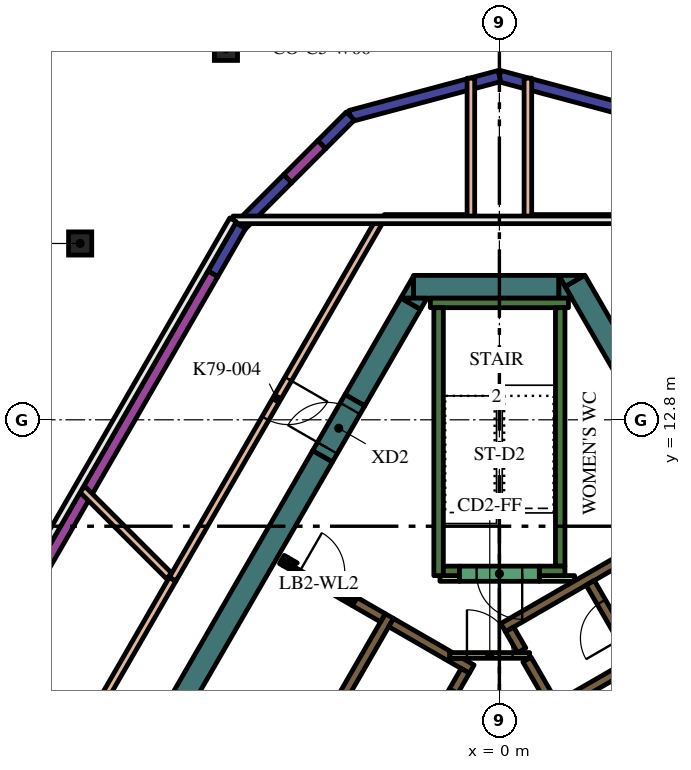
"""IFC4 building model, lengths in metres.
Left out: names, types, materials, properties, quantities, classifications, styles, units other than length and angle.
Written with IfcOpenShell. Run it as: python <this file> out.ifc"""

import sys

from ifc_helpers import new_model, si_unit, direction, frame, frame_2d, origin, origin_2d, place, context, subcontext, project, spatial, polyline, rectangle, hollow_circle, outline, extrude, element, fill, save


model = new_model("IFC4")
c1 = context("Model", 3, precision=1e-05, world=origin(), true_north=direction((0.0, 1.0)))
c2 = subcontext(c1, "Body", "Model", "MODEL_VIEW")
j1 = project(units=[si_unit("LENGTHUNIT", "METRE"), si_unit("PLANEANGLEUNIT", "RADIAN")], contexts=[c1])
p1 = place(None, origin())
s1 = spatial("IfcSite", under=j1, at=p1, CompositionType="ELEMENT")
p2 = place(p1, origin())
s2 = spatial("IfcBuilding", under=s1, at=p2, CompositionType="ELEMENT")
p3 = place(p2, frame((0.0, 0.0, 340.2)))
s3 = spatial("IfcBuildingStorey", under=s2, at=p3, CompositionType="ELEMENT", Elevation=340.2)
for number, where, z_axis, x_axis in (
    (1, (-7.195, 22.561, 0.0), (0.0, 0.0, 1.0), (1.0, 0.0, 0.0)),
    (2, (-11.032, 17.44, 0.0), (0.0, 0.0, 1.0), (1.0, 0.0, 0.0)),
):
    element("IfcColumn", number, at=place(p3, frame(where, z_axis=z_axis, x_axis=x_axis)), inside=s3, PredefinedType="COLUMN", context=c2, shape_type="SweptSolid", body=[
        extrude(hollow_circle(Radius=0.305, WallThickness=0.025, at=origin_2d()), origin(), (0.0, 0.0, 1.0), 4.2),
    ])
p4 = place(p3, frame((1.989, 16.456, 0.0), z_axis=(0.0, 0.0, 1.0), x_axis=(0.499990476767, -0.866030901956, 0.0)))
e3 = element("IfcWall", 3, at=p4, inside=s3, PredefinedType="SOLIDWALL", context=c2, shape_type="SweptSolid", body=[
    extrude(rectangle(XDim=7.438, YDim=0.6, at=frame_2d((3.719, 0.0))), origin(), (0.0, 0.0, 1.0), 4.2),
])
p5 = place(p3, origin())
e4 = element("IfcWall", 4, at=p5, inside=s3, PredefinedType="SOLIDWALL", context=c2, shape_type="SweptSolid", body=[
    extrude(outline(polyline([(1.559, 16.6), (2.235, 16.6), (1.728, 16.307), (1.559, 16.6)])), origin(), (0.0, 0.0, 1.0), 4.2),
])
p6 = place(p3, frame((-2.258, 16.3, 0.0), z_axis=(0.0, 0.0, 1.0), x_axis=(1.0, 0.0, 0.0)))
e5 = element("IfcWall", 5, at=p6, inside=s3, PredefinedType="SOLIDWALL", context=c2, shape_type="SweptSolid", body=[
    extrude(rectangle(XDim=3.823, YDim=0.6, at=frame_2d((1.912, 0.0))), origin(), (0.0, 0.0, 1.0), 4.2),
])
e6 = element("IfcWall", 6, at=p5, inside=s3, PredefinedType="SOLIDWALL", context=c2, shape_type="SweptSolid", body=[
    extrude(outline(polyline([(1.905, 16.0), (1.567, 16.0), (1.567, 16.585), (1.905, 16.0)])), origin(), (0.0, 0.0, 1.0), 4.2),
])
e7 = element("IfcWall", 7, at=p5, inside=s3, PredefinedType="SOLIDWALL", context=c2, shape_type="SweptSolid", body=[
    extrude(outline(polyline([(-2.598, 16.0), (-2.26, 16.585), (-2.26, 16.0), (-2.598, 16.0)])), origin(), (0.0, 0.0, 1.0), 4.2),
])
p7 = place(p3, frame((-2.335, 15.855, 0.0), z_axis=(0.0, 0.0, 1.0), x_axis=(-0.499960127962, -0.866048422692, 0.0)))
e8 = element("IfcWall", 8, at=p7, inside=s3, PredefinedType="SOLIDWALL", context=c2, shape_type="SweptSolid", body=[
    extrude(rectangle(XDim=2.934, YDim=0.6, at=frame_2d((1.467, 0.0))), origin(), (0.0, 0.0, 1.0), 4.2),
])
e9 = element("IfcWall", 9, at=p5, inside=s3, PredefinedType="SOLIDWALL", context=c2, shape_type="SweptSolid", body=[
    extrude(outline(polyline([(-1.905, 16.0), (-2.074, 15.707), (-2.581, 16.0), (-1.905, 16.0)])), origin(), (0.0, 0.0, 1.0), 4.2),
])
p8 = place(p3, frame((-4.652, 11.842, 0.0), z_axis=(0.0, 0.0, 1.0), x_axis=(-0.500003640647, -0.866023301845, 0.0)))
e10 = element("IfcWall", 10, at=p8, inside=s3, PredefinedType="SOLIDWALL", context=c2, shape_type="SweptSolid", body=[
    extrude(rectangle(XDim=15.858, YDim=0.6, at=frame_2d((7.929, 0.0))), origin(), (0.0, 0.0, 1.0), 4.2),
])
p9 = place(p3, frame((-1.817, 15.875, 0.0), z_axis=(0.0, 0.0, 1.0), x_axis=(1.0, 0.0, 0.0)))
e11 = element("IfcWall", 11, at=p9, inside=s3, PredefinedType="SOLIDWALL", context=c2, shape_type="SweptSolid", body=[
    extrude(rectangle(XDim=3.634, YDim=0.25, at=frame_2d((1.817, 0.0))), origin(), (0.0, 0.0, 1.0), 4.2),
])
p10 = place(p3, frame((1.6, 8.95, 0.0), z_axis=(0.0, 0.0, 1.0), x_axis=(0.0, 1.0, 0.0)))
e12 = element("IfcWall", 12, at=p10, inside=s3, PredefinedType="SOLIDWALL", context=c2, shape_type="SweptSolid", body=[
    extrude(rectangle(XDim=6.8, YDim=0.25, at=frame_2d((3.4, 0.0))), origin(), (0.0, 0.0, 1.0), 4.2),
])
p11 = place(p3, frame((1.05, 8.825, 0.0), z_axis=(0.0, 0.0, 1.0), x_axis=(1.0, 0.0, 0.0)))
e13 = element("IfcWall", 13, at=p11, inside=s3, PredefinedType="SOLIDWALL", context=c2, shape_type="SweptSolid", body=[
    extrude(rectangle(XDim=0.675, YDim=0.25, at=frame_2d((0.337, 0.0))), origin(), (0.0, 0.0, 1.0), 4.2),
])
p12 = place(p3, frame((-1.6, 8.7, 0.0), z_axis=(0.0, 0.0, 1.0), x_axis=(0.0, 1.0, 0.0)))
e14 = element("IfcWall", 14, at=p12, inside=s3, PredefinedType="SOLIDWALL", context=c2, shape_type="SweptSolid", body=[
    extrude(rectangle(XDim=7.05, YDim=0.25, at=frame_2d((3.525, 0.0))), origin(), (0.0, 0.0, 1.0), 4.2),
])
p13 = place(p3, frame((-1.475, 8.825, 0.0), z_axis=(0.0, 0.0, 1.0), x_axis=(1.0, 0.0, 0.0)))
e15 = element("IfcWall", 15, at=p13, inside=s3, PredefinedType="SOLIDWALL", context=c2, shape_type="SweptSolid", body=[
    extrude(rectangle(XDim=0.425, YDim=0.25, at=frame_2d((0.212, 0.0))), origin(), (0.0, 0.0, 1.0), 4.2),
])
p14 = place(p3, frame((3.647, 9.38, 0.0), z_axis=(0.0, 0.0, 1.0), x_axis=(-0.866027868628, -0.499995730742, 0.0)))
e16 = element("IfcWall", 16, at=p14, inside=s3, PredefinedType="SOLIDWALL", context=c2, shape_type="SweptSolid", body=[
    extrude(rectangle(XDim=4.099, YDim=0.25, at=frame_2d((2.049, 0.0))), origin(), (0.0, 0.0, 1.0), 4.2),
])
p15 = place(p3, frame((0.268, 7.285, 0.0), z_axis=(0.0, 0.0, 1.0), x_axis=(0.500098681536, -0.865968422476, 0.0)))
e17 = element("IfcWall", 17, at=p15, inside=s3, PredefinedType="SOLIDWALL", context=c2, shape_type="SweptSolid", body=[
    extrude(rectangle(XDim=0.636, YDim=0.25, at=frame_2d((0.318, 0.0))), origin(), (0.0, 0.0, 1.0), 4.2),
])
p16 = place(p3, frame((5.97, -2.591, 0.0), z_axis=(0.0, 0.0, 1.0), x_axis=(-0.499994469932, 0.866028596547, 0.0)))
e18 = element("IfcWall", 18, at=p16, inside=s3, PredefinedType="SOLIDWALL", context=c2, shape_type="SweptSolid", body=[
    extrude(rectangle(XDim=10.488, YDim=0.25, at=frame_2d((5.244, 0.0))), origin(), (0.0, 0.0, 1.0), 4.2),
])
p17 = place(p3, frame((1.574, 5.274, 0.0), z_axis=(0.0, 0.0, 1.0), x_axis=(0.866028486751, 0.499994660107, 0.0)))
e19 = element("IfcWall", 19, at=p17, inside=s3, PredefinedType="SOLIDWALL", context=c2, shape_type="SweptSolid", body=[
    extrude(rectangle(XDim=2.2, YDim=0.25, at=frame_2d((1.1, 0.0))), origin(), (0.0, 0.0, 1.0), 4.2),
])
p18 = place(p3, frame((-8.06, -1.311, 0.0), z_axis=(0.0, 0.0, 1.0), x_axis=(0.50000273126, 0.866023826885, 0.0)))
e20 = element("IfcWall", 20, at=p18, inside=s3, PredefinedType="SOLIDWALL", context=c2, shape_type="SweptSolid", body=[
    extrude(rectangle(XDim=10.33, YDim=0.25, at=frame_2d((5.165, 0.0))), origin(), (0.0, 0.0, 1.0), 4.2),
])
e21 = element("IfcWall", 21, at=p5, inside=s3, PredefinedType="SOLIDWALL", context=c2, shape_type="SweptSolid", body=[
    extrude(outline(polyline([(-2.912, 7.356), (-2.787, 7.573), (-1.232, 6.675), (-1.303, 6.675), (-1.304, 6.675), (-1.304, 6.675), (-1.304, 6.525), (-1.304, 6.525), (-1.303, 6.525), (-0.971, 6.525), (-0.665, 6.348), (-0.79, 6.132), (-1.007, 6.257), (-1.007, 6.257), (-2.912, 7.356)])), origin(), (0.0, 0.0, 1.0), 4.2),
])
p19 = place(p3, frame((-5.725, 9.125, 0.0), z_axis=(0.0, 0.0, 1.0), x_axis=(0.866185586049, -0.49972245349, 0.0)))
e22 = element("IfcWall", 22, at=p19, inside=s3, PredefinedType="SOLIDWALL", context=c2, shape_type="SweptSolid", body=[
    extrude(rectangle(XDim=0.11, YDim=0.25, at=frame_2d((0.055, 0.0))), origin(), (0.0, 0.0, 1.0), 4.2),
])
p20 = place(p3, frame((-3.066, 7.59, 0.0), z_axis=(0.0, 0.0, 1.0), x_axis=(-0.866081358704, 0.49990307071, 0.0)))
e23 = element("IfcWall", 23, at=p20, inside=s3, PredefinedType="SOLIDWALL", context=c2, shape_type="SweptSolid", body=[
    extrude(rectangle(XDim=0.858, YDim=0.25, at=frame_2d((0.429, 0.0))), origin(), (0.0, 0.0, 1.0), 4.2),
])
e24 = element("IfcWall", 24, at=p5, inside=s3, PredefinedType="SOLIDWALL", context=c2, shape_type="SweptSolid", body=[
    extrude(outline(polyline([(-3.748, 8.128), (-3.813, 8.015), (-4.027, 8.139), (-4.017, 8.156), (-4.008, 8.173), (-4.0, 8.192), (-3.995, 8.21), (-3.991, 8.23), (-3.99, 8.25), (-3.99, 8.268), (-3.748, 8.128)])), origin(), (0.0, 0.0, 1.0), 4.2),
])
e25 = element("IfcWall", 25, at=p5, inside=s3, PredefinedType="SOLIDWALL", context=c2, shape_type="SweptSolid", body=[
    extrude(outline(polyline([(-5.689, 8.96), (-5.69, 8.961), (-5.565, 9.177), (-5.319, 9.035), (-5.335, 9.026), (-5.351, 9.015), (-5.366, 9.002), (-5.379, 8.988), (-5.392, 8.972), (-5.402, 8.956), (-5.412, 8.939), (-5.629, 9.064), (-5.629, 9.064), (-5.689, 8.96)])), origin(), (0.0, 0.0, 1.0), 4.2),
])
p21 = place(p3, frame((1.05, 8.625, 0.0), z_axis=(0.0, 0.0, 1.0), x_axis=(1.0, 0.0, 0.0)))
e26 = element("IfcWall", 26, at=p21, inside=s3, PredefinedType="PARTITIONING", context=c2, shape_type="SweptSolid", body=[
    extrude(rectangle(XDim=0.929, YDim=0.15, at=frame_2d((0.464, 0.0))), origin(), (0.0, 0.0, 1.0), 3.45),
])
p22 = place(p3, frame((-1.564, 8.625, 0.0), z_axis=(0.0, 0.0, 1.0), x_axis=(1.0, 0.0, 0.0)))
e27 = element("IfcWall", 27, at=p22, inside=s3, PredefinedType="PARTITIONING", context=c2, shape_type="SweptSolid", body=[
    extrude(rectangle(XDim=0.514, YDim=0.15, at=frame_2d((0.257, 0.0))), origin(), (0.0, 0.0, 1.0), 3.45),
])
p23 = place(p3, frame((8.565, -2.185, 0.0), z_axis=(0.0, 0.0, 1.0), x_axis=(-0.499997954832, 0.866026584559, 0.0)))
e28 = element("IfcWall", 28, at=p23, inside=s3, PredefinedType="SOLIDWALL", context=c2, shape_type="SweptSolid", body=[
    extrude(rectangle(XDim=12.35, YDim=0.25, at=frame_2d((6.175, 0.0))), origin(), (0.0, 0.0, 1.0), 4.2),
])
p24 = place(p23, frame((0.685, 0.0, 0.0)))
e29 = element("IfcOpeningElement", 29, at=p24, cuts=e28, PredefinedType="OPENING", context=c2, shape_type="SweptSolid", body=[
    extrude(rectangle(XDim=0.9, YDim=2.1, at=frame_2d((0.45, 1.05))), frame((0.0, 0.135, 0.0), z_axis=(0.0, -1.0, 0.0), x_axis=(1.0, 0.0, 0.0)), (0.0, 0.0, 1.0), 0.27),
])
p25 = place(p23, frame((3.105, 0.0, 0.0)))
e30 = element("IfcOpeningElement", 30, at=p25, cuts=e28, PredefinedType="OPENING", context=c2, shape_type="SweptSolid", body=[
    extrude(rectangle(XDim=1.1, YDim=2.1, at=frame_2d((0.55, 1.05))), frame((0.0, 0.135, 0.0), z_axis=(0.0, -1.0, 0.0), x_axis=(1.0, 0.0, 0.0)), (0.0, 0.0, 1.0), 0.27),
])
p26 = place(p23, frame((5.625, 0.0, 0.0)))
e31 = element("IfcOpeningElement", 31, at=p26, cuts=e28, PredefinedType="OPENING", context=c2, shape_type="SweptSolid", body=[
    extrude(rectangle(XDim=1.1, YDim=2.1, at=frame_2d((0.55, 1.05))), frame((0.0, 0.135, 0.0), z_axis=(0.0, -1.0, 0.0), x_axis=(1.0, 0.0, 0.0)), (0.0, 0.0, 1.0), 0.27),
])
p27 = place(p23, frame((8.145, 0.0, 0.0)))
e32 = element("IfcOpeningElement", 32, at=p27, cuts=e28, PredefinedType="OPENING", context=c2, shape_type="SweptSolid", body=[
    extrude(rectangle(XDim=1.1, YDim=2.1, at=frame_2d((0.55, 1.05))), frame((0.0, 0.135, 0.0), z_axis=(0.0, -1.0, 0.0), x_axis=(1.0, 0.0, 0.0)), (0.0, 0.0, 1.0), 0.27),
])
p28 = place(p23, frame((10.665, 0.0, 0.0)))
e33 = element("IfcOpeningElement", 33, at=p28, cuts=e28, PredefinedType="OPENING", context=c2, shape_type="SweptSolid", body=[
    extrude(rectangle(XDim=1.1, YDim=2.1, at=frame_2d((0.55, 1.05))), frame((0.0, 0.135, 0.0), z_axis=(0.0, -1.0, 0.0), x_axis=(1.0, 0.0, 0.0)), (0.0, 0.0, 1.0), 0.27),
])
p29 = place(p3, frame((-0.898, 6.194, 0.0), z_axis=(0.0, 0.0, 1.0), x_axis=(-0.499996202215, -0.866027596426, 0.0)))
e34 = element("IfcWall", 34, at=p29, inside=s3, PredefinedType="SOLIDWALL", context=c2, shape_type="SweptSolid", body=[
    extrude(rectangle(XDim=9.83, YDim=0.25, at=frame_2d((4.915, 0.0))), origin(), (0.0, 0.0, 1.0), 4.2),
])
p30 = place(p29, frame((0.585, 0.0, 0.0)))
e35 = element("IfcOpeningElement", 35, at=p30, cuts=e34, PredefinedType="OPENING", context=c2, shape_type="SweptSolid", body=[
    extrude(rectangle(XDim=1.1, YDim=2.1, at=frame_2d((0.55, 1.05))), frame((0.0, 0.135, 0.0), z_axis=(0.0, -1.0, 0.0), x_axis=(1.0, 0.0, 0.0)), (0.0, 0.0, 1.0), 0.27),
])
p31 = place(p29, frame((3.105, 0.0, 0.0)))
e36 = element("IfcOpeningElement", 36, at=p31, cuts=e34, PredefinedType="OPENING", context=c2, shape_type="SweptSolid", body=[
    extrude(rectangle(XDim=1.1, YDim=2.1, at=frame_2d((0.55, 1.05))), frame((0.0, 0.135, 0.0), z_axis=(0.0, -1.0, 0.0), x_axis=(1.0, 0.0, 0.0)), (0.0, 0.0, 1.0), 0.27),
])
p32 = place(p29, frame((5.625, 0.0, 0.0)))
e37 = element("IfcOpeningElement", 37, at=p32, cuts=e34, PredefinedType="OPENING", context=c2, shape_type="SweptSolid", body=[
    extrude(rectangle(XDim=1.1, YDim=2.1, at=frame_2d((0.55, 1.05))), frame((0.0, 0.135, 0.0), z_axis=(0.0, -1.0, 0.0), x_axis=(1.0, 0.0, 0.0)), (0.0, 0.0, 1.0), 0.27),
])
p33 = place(p29, frame((8.145, 0.0, 0.0)))
e38 = element("IfcOpeningElement", 38, at=p33, cuts=e34, PredefinedType="OPENING", context=c2, shape_type="SweptSolid", body=[
    extrude(rectangle(XDim=1.1, YDim=2.1, at=frame_2d((0.55, 1.05))), frame((0.0, 0.135, 0.0), z_axis=(0.0, -1.0, 0.0), x_axis=(1.0, 0.0, 0.0)), (0.0, 0.0, 1.0), 0.27),
])
p34 = place(p3, frame((1.05, 8.75, 0.0), z_axis=(0.0, 0.0, 1.0), x_axis=(-1.0, 0.0, 0.0)))
e39 = element("IfcWall", 39, at=p34, inside=s3, PredefinedType="SOLIDWALL", context=c2, shape_type="SweptSolid", body=[
    extrude(rectangle(XDim=2.1, YDim=0.4, at=frame_2d((1.05, 0.0))), origin(), (0.0, 0.0, 1.0), 4.2),
])
p35 = place(p34, frame((0.45, 0.0, 0.0)))
e40 = element("IfcOpeningElement", 40, at=p35, cuts=e39, PredefinedType="OPENING", context=c2, shape_type="SweptSolid", body=[
    extrude(rectangle(XDim=1.2, YDim=2.1, at=frame_2d((0.6, 1.05))), frame((0.0, 0.21, 0.0), z_axis=(0.0, -1.0, 0.0), x_axis=(1.0, 0.0, 0.0)), (0.0, 0.0, 1.0), 0.42),
])
p36 = place(p3, frame((-1.303, 6.6, 0.0), z_axis=(0.0, 0.0, 1.0), x_axis=(1.0, 0.0, 0.0)))
e41 = element("IfcWall", 41, at=p36, inside=s3, PredefinedType="PARTITIONING", context=c2, shape_type="SweptSolid", body=[
    extrude(rectangle(XDim=2.1, YDim=0.15, at=frame_2d((1.05, 0.0))), origin(), (0.0, 0.0, 1.0), 4.2),
])
p37 = place(p36, frame((0.45, 0.0, 0.0)))
e42 = element("IfcOpeningElement", 42, at=p37, cuts=e41, PredefinedType="OPENING", context=c2, shape_type="SweptSolid", body=[
    extrude(rectangle(XDim=1.2, YDim=2.1, at=frame_2d((0.6, 1.05))), frame((0.0, 0.085, 0.0), z_axis=(0.0, -1.0, 0.0), x_axis=(1.0, 0.0, 0.0)), (0.0, 0.0, 1.0), 0.17),
])
p38 = place(p3, frame((-5.659, 9.012, 0.0), z_axis=(0.0, 0.0, 1.0), x_axis=(0.866009402589, -0.500027713859, 0.0)))
e43 = element("IfcWall", 43, at=p38, inside=s3, PredefinedType="PARTITIONING", context=c2, shape_type="SweptSolid", body=[
    extrude(rectangle(XDim=2.1, YDim=0.12, at=frame_2d((1.05, 0.0))), origin(), (0.0, 0.0, 1.0), 3.45),
])
p39 = place(p38, frame((0.45, 0.0, 0.0)))
e44 = element("IfcOpeningElement", 44, at=p39, cuts=e43, PredefinedType="OPENING", context=c2, shape_type="SweptSolid", body=[
    extrude(rectangle(XDim=1.2, YDim=2.1, at=frame_2d((0.6, 1.05))), frame((0.0, 0.07, 0.0), z_axis=(0.0, -1.0, 0.0), x_axis=(1.0, 0.0, 0.0)), (0.0, 0.0, 1.0), 0.14),
])
p40 = place(p3, frame((-4.652, 11.842, 0.0), z_axis=(0.0, 0.0, 1.0), x_axis=(0.500062241894, 0.865989465428, 0.0)))
e45 = element("IfcWall", 45, at=p40, inside=s3, PredefinedType="SOLIDWALL", context=c2, shape_type="SweptSolid", body=[
    extrude(rectangle(XDim=1.7, YDim=0.6, at=frame_2d((0.85, 0.0))), origin(), (0.0, 0.0, 1.0), 4.2),
])
p41 = place(p40, frame((0.25, 0.0, 0.0)))
e46 = element("IfcOpeningElement", 46, at=p41, cuts=e45, PredefinedType="OPENING", context=c2, shape_type="SweptSolid", body=[
    extrude(rectangle(XDim=1.2, YDim=2.1, at=frame_2d((0.6, 1.05))), frame((0.0, 0.31, 0.0), z_axis=(0.0, -1.0, 0.0), x_axis=(1.0, 0.0, 0.0)), (0.0, 0.0, 1.0), 0.62),
])
p42 = place(p3, frame((-8.602, 8.602, 0.0), z_axis=(0.0, 0.0, 1.0), x_axis=(-0.499992973356, -0.866029460581, 0.0)))
e47 = element("IfcWall", 47, at=p42, inside=s3, PredefinedType="PARTITIONING", context=c2, shape_type="SweptSolid", body=[
    extrude(rectangle(XDim=17.265, YDim=0.2, at=frame_2d((8.632, 0.0))), origin(), (0.0, 0.0, 1.0), 3.45),
])
p43 = place(p42, frame((7.833, 0.0, 0.0)))
e48 = element("IfcOpeningElement", 48, at=p43, cuts=e47, PredefinedType="OPENING", context=c2, shape_type="SweptSolid", body=[
    extrude(rectangle(XDim=1.6, YDim=2.1, at=frame_2d((0.8, 1.05))), frame((0.0, 0.11, 0.0), z_axis=(0.0, -1.0, 0.0), x_axis=(1.0, 0.0, 0.0)), (0.0, 0.0, 1.0), 0.22),
])
p44 = place(p3, frame((-3.118, 18.1, 0.0), z_axis=(0.0, 0.0, 1.0), x_axis=(-0.499996953601, -0.866027162616, 0.0)))
e49 = element("IfcWall", 49, at=p44, inside=s3, PredefinedType="PARTITIONING", context=c2, shape_type="SweptSolid", body=[
    extrude(rectangle(XDim=10.958, YDim=0.2, at=frame_2d((5.479, 0.0))), origin(), (0.0, 0.0, 1.0), 3.45),
])
p45 = place(p44, frame((4.879, 0.0, 0.0)))
e50 = element("IfcOpeningElement", 50, at=p45, cuts=e49, PredefinedType="OPENING", context=c2, shape_type="SweptSolid", body=[
    extrude(rectangle(XDim=1.2, YDim=2.1, at=frame_2d((0.6, 1.05))), frame((0.0, 0.11, 0.0), z_axis=(0.0, -1.0, 0.0), x_axis=(1.0, 0.0, 0.0)), (0.0, 0.0, 1.0), 0.22),
])
for number, where, z_axis, x_axis in (
    (51, (0.75, 21.789, 0.0), (0.0, 0.0, 1.0), (0.0, -1.0, 0.0)),
    (52, (-0.75, 18.1, 0.0), (0.0, 0.0, 1.0), (0.0, 1.0, 0.0)),
):
    element("IfcWall", number, at=place(p3, frame(where, z_axis=z_axis, x_axis=x_axis)), inside=s3, PredefinedType="PARTITIONING", context=c2, shape_type="SweptSolid", body=[
        extrude(rectangle(XDim=3.688, YDim=0.2, at=frame_2d((1.844, 0.0))), origin(), (0.0, 0.0, 1.0), 3.45),
    ])
p46 = place(p3, frame((-8.694, 8.694, 0.0), z_axis=(0.0, 0.0, 1.0), x_axis=(-0.707106781187, 0.707106781187, 0.0)))
e53 = element("IfcWall", 53, at=p46, inside=s3, PredefinedType="PARTITIONING", context=c2, shape_type="SweptSolid", body=[
    extrude(rectangle(XDim=3.224, YDim=0.2, at=frame_2d((1.612, 0.0))), origin(), (0.0, 0.0, 1.0), 3.45),
])
for number, where, z_axis, x_axis in (
    (54, (-3.028, 18.1, 0.0), (0.0, 0.0, 1.0), (1.0, 0.0, 0.0)),
    (55, (0.85, 18.1, 0.0), (0.0, 0.0, 1.0), (1.0, 0.0, 0.0)),
):
    element("IfcWall", number, at=place(p3, frame(where, z_axis=z_axis, x_axis=x_axis)), inside=s3, PredefinedType="PARTITIONING", context=c2, shape_type="SweptSolid", body=[
        extrude(rectangle(XDim=2.177, YDim=0.2, at=frame_2d((1.089, 0.0))), origin(), (0.0, 0.0, 1.0), 3.45),
    ])
for number, where, z_axis, x_axis in (
    (56, (3.922, 20.794, 0.0), (0.0, 0.0, 1.0), (-0.966, 0.259, 0.0)),
    (57, (0.0, 21.845, 0.0), (0.0, 0.0, 1.0), (-0.966, -0.259, 0.0)),
):
    element("IfcWall", number, at=place(p3, frame(where, z_axis=z_axis, x_axis=x_axis)), inside=s3, PredefinedType="SOLIDWALL", context=c2, shape_type="SweptSolid", body=[
        extrude(rectangle(XDim=4.061, YDim=0.3, at=frame_2d((2.03, 0.0))), origin(), (0.0, 0.0, 1.0), 3.95),
    ])
p47 = place(p3, frame((-3.922, 20.794, 0.0), z_axis=(0.0, 0.0, 1.0), x_axis=(-0.707106781187, -0.707106781187, 0.0)))
e58 = element("IfcWall", 58, at=p47, inside=s3, PredefinedType="SOLIDWALL", context=c2, shape_type="SweptSolid", body=[
    extrude(rectangle(XDim=1.065, YDim=0.3, at=frame_2d((0.532, 0.0))), origin(), (0.0, 0.0, 1.0), 3.95),
])
p48 = place(p3, frame((-4.675, 20.041, 0.0), z_axis=(0.0, 0.0, 1.0), x_axis=(-0.707106781187, -0.707106781187, 0.0)))
e59 = element("IfcWall", 59, at=p48, inside=s3, PredefinedType="SOLIDWALL", context=c2, shape_type="SweptSolid", body=[
    extrude(rectangle(XDim=1.264, YDim=0.3, at=frame_2d((0.632, 0.0))), origin(), (0.0, 0.0, 1.0), 3.45),
])
p49 = place(p3, frame((-5.569, 19.147, 0.0), z_axis=(0.0, 0.0, 1.0), x_axis=(-0.707106781187, -0.707106781187, 0.0)))
e60 = element("IfcWall", 60, at=p49, inside=s3, PredefinedType="SOLIDWALL", context=c2, shape_type="SweptSolid", body=[
    extrude(rectangle(XDim=1.752, YDim=0.3, at=frame_2d((0.876, 0.0))), origin(), (0.0, 0.0, 1.0), 3.95),
])
p50 = place(p3, frame((-6.808, 17.908, 0.0), z_axis=(0.0, 0.0, 1.0), x_axis=(-0.499977492351, -0.866038398192, 0.0)))
e61 = element("IfcWall", 61, at=p50, inside=s3, PredefinedType="SOLIDWALL", context=c2, shape_type="SweptSolid", body=[
    extrude(rectangle(XDim=1.464, YDim=0.3, at=frame_2d((0.732, 0.0))), origin(), (0.0, 0.0, 1.0), 3.95),
])
p51 = place(p3, frame((-7.54, 16.64, 0.0), z_axis=(0.0, 0.0, 1.0), x_axis=(-0.500002158106, -0.866024157798, 0.0)))
e62 = element("IfcWall", 62, at=p51, inside=s3, PredefinedType="SOLIDWALL", context=c2, shape_type="SweptSolid", body=[
    extrude(rectangle(XDim=21.282, YDim=0.3, at=frame_2d((10.641, 0.0))), origin(), (0.0, 0.0, 1.0), 3.45),
])
p52 = place(p28, origin())
e63 = element("IfcDoor", 63, at=p52, inside=s3, OperationType="DOUBLE_DOOR_SLIDING", PredefinedType="DOOR", context=c2, shape_type="SweptSolid", body=[
    extrude(rectangle(XDim=1.1, YDim=2.1, at=frame_2d((0.55, 1.05))), frame((0.0, 0.025, 0.0), z_axis=(0.0, -1.0, 0.0), x_axis=(1.0, 0.0, 0.0)), (0.0, 0.0, 1.0), 0.05),
])
fill(e33, e63)
p53 = place(p30, origin())
e64 = element("IfcDoor", 64, at=p53, inside=s3, OperationType="DOUBLE_DOOR_SLIDING", PredefinedType="DOOR", context=c2, shape_type="SweptSolid", body=[
    extrude(rectangle(XDim=1.1, YDim=2.1, at=frame_2d((0.55, 1.05))), frame((0.0, 0.025, 0.0), z_axis=(0.0, -1.0, 0.0), x_axis=(1.0, 0.0, 0.0)), (0.0, 0.0, 1.0), 0.05),
])
fill(e35, e64)
p54 = place(p35, origin())
e65 = element("IfcDoor", 65, at=p54, inside=s3, OperationType="SINGLE_SWING_LEFT", PredefinedType="DOOR", context=c2, shape_type="SweptSolid", body=[
    extrude(rectangle(XDim=1.2, YDim=2.1, at=frame_2d((0.6, 1.05))), frame((0.0, 0.025, 0.0), z_axis=(0.0, -1.0, 0.0), x_axis=(1.0, 0.0, 0.0)), (0.0, 0.0, 1.0), 0.05),
])
fill(e40, e65)
p55 = place(p37, origin())
e66 = element("IfcDoor", 66, at=p55, inside=s3, OperationType="SINGLE_SWING_LEFT", PredefinedType="DOOR", context=c2, shape_type="SweptSolid", body=[
    extrude(rectangle(XDim=1.2, YDim=2.1, at=frame_2d((0.6, 1.05))), frame((0.0, 0.025, 0.0), z_axis=(0.0, -1.0, 0.0), x_axis=(1.0, 0.0, 0.0)), (0.0, 0.0, 1.0), 0.05),
])
fill(e42, e66)
p56 = place(p39, origin())
e67 = element("IfcDoor", 67, at=p56, inside=s3, OperationType="SINGLE_SWING_LEFT", PredefinedType="DOOR", context=c2, shape_type="SweptSolid", body=[
    extrude(rectangle(XDim=1.2, YDim=2.1, at=frame_2d((0.6, 1.05))), frame((0.0, 0.025, 0.0), z_axis=(0.0, -1.0, 0.0), x_axis=(1.0, 0.0, 0.0)), (0.0, 0.0, 1.0), 0.05),
])
fill(e44, e67)
p57 = place(p41, origin())
e68 = element("IfcDoor", 68, at=p57, inside=s3, OperationType="SINGLE_SWING_LEFT", PredefinedType="DOOR", context=c2, shape_type="SweptSolid", body=[
    extrude(rectangle(XDim=1.2, YDim=2.1, at=frame_2d((0.6, 1.05))), frame((0.0, 0.025, 0.0), z_axis=(0.0, -1.0, 0.0), x_axis=(1.0, 0.0, 0.0)), (0.0, 0.0, 1.0), 0.05),
])
fill(e46, e68)
p58 = place(p45, origin())
e69 = element("IfcDoor", 69, at=p58, inside=s3, OperationType="SINGLE_SWING_RIGHT", PredefinedType="DOOR", context=c2, shape_type="SweptSolid", body=[
    extrude(rectangle(XDim=1.2, YDim=2.1, at=frame_2d((0.6, 1.05))), frame((0.0, 0.025, 0.0), z_axis=(0.0, -1.0, 0.0), x_axis=(1.0, 0.0, 0.0)), (0.0, 0.0, 1.0), 0.05),
])
fill(e50, e69)
save(model, sys.argv[1])
